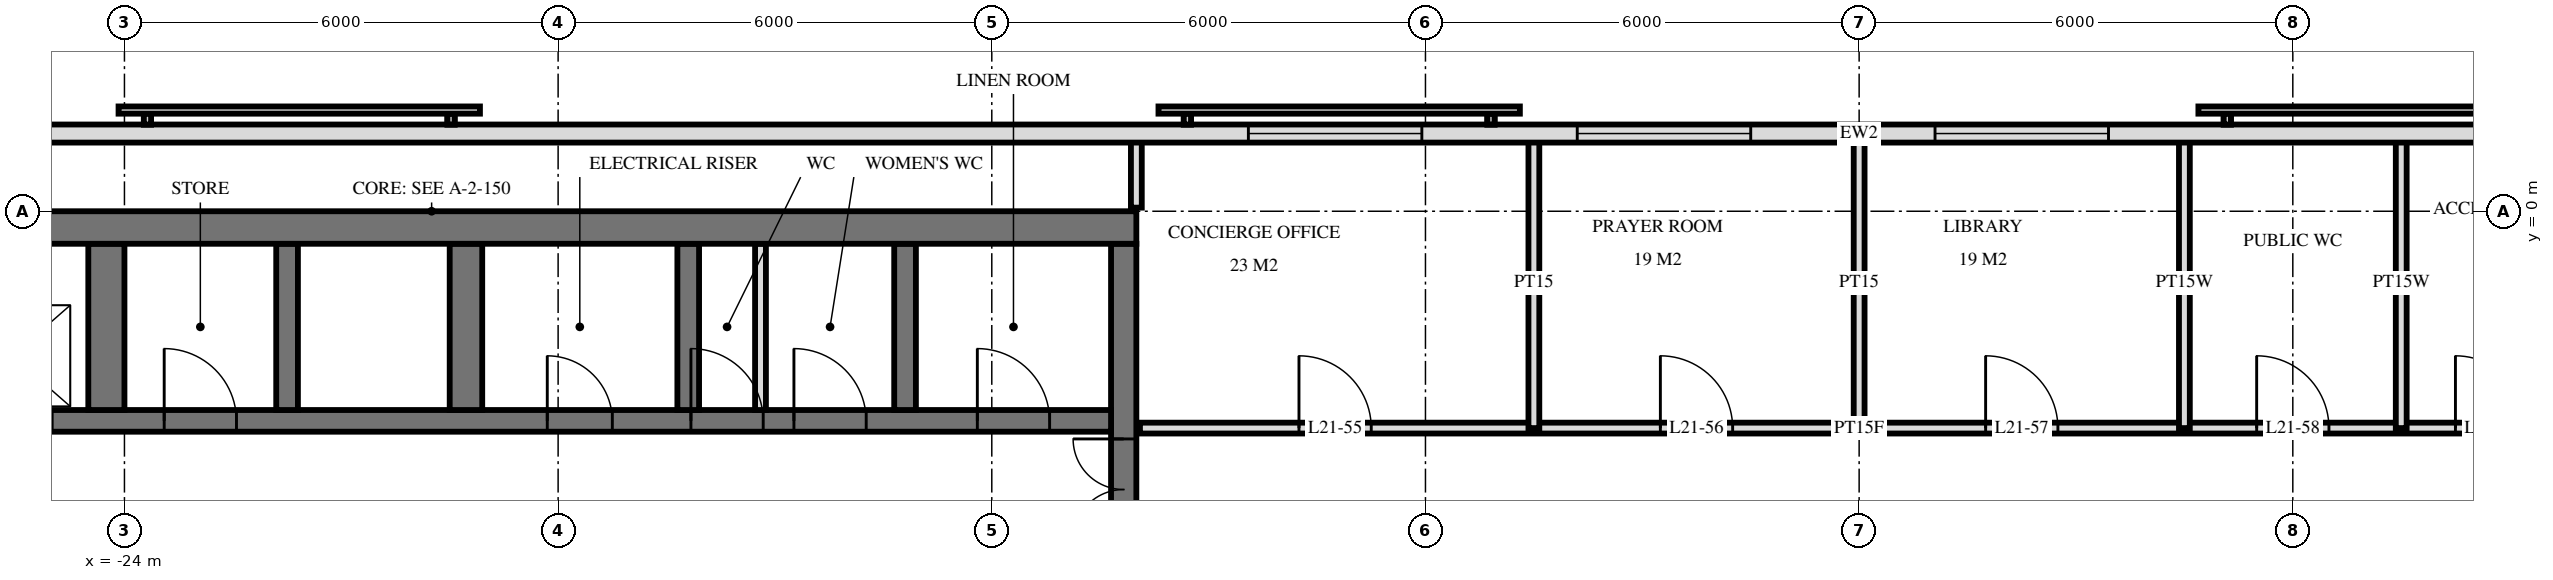
"""IFC4 building model, lengths in metres.
Left out: names, types, materials, properties, quantities, classifications, styles, units other than length and angle.
Written with IfcOpenShell. Run it as: python <this file> out.ifc"""

import sys

from ifc_helpers import new_model, si_unit, direction, frame, frame_2d, origin, place, context, subcontext, project, spatial, rectangle, extrude, element, fill, save


model = new_model("IFC4")
c1 = context("Model", 3, precision=1e-05, world=origin(), true_north=direction((0.0, 1.0)))
c2 = subcontext(c1, "Body", "Model", "MODEL_VIEW")
j1 = project(units=[si_unit("LENGTHUNIT", "METRE"), si_unit("PLANEANGLEUNIT", "RADIAN")], contexts=[c1])
p1 = place(None, origin())
s1 = spatial("IfcSite", under=j1, at=p1, CompositionType="ELEMENT")
p2 = place(p1, origin())
s2 = spatial("IfcBuilding", under=s1, at=p2, CompositionType="ELEMENT")
p3 = place(p2, frame((0.0, 0.0, 85.2)))
s3 = spatial("IfcBuildingStorey", under=s2, at=p3, CompositionType="ELEMENT", Elevation=85.2)
p4 = place(p3, frame((-29.5, -0.225, 0.0), z_axis=(0.0, 0.0, 1.0), x_axis=(1.0, 0.0, 0.0)))
e1 = element("IfcWall", 1, at=p4, inside=s3, PredefinedType="SHEAR", context=c2, shape_type="SweptSolid", body=[
    extrude(rectangle(XDim=19.5, YDim=0.45, at=frame_2d((9.75, 0.0))), origin(), (0.0, 0.0, 1.0), 3.6),
])
p5 = place(p3, frame((-10.175, -14.55, 0.0), z_axis=(0.0, 0.0, 1.0), x_axis=(0.0, 1.0, 0.0)))
e2 = element("IfcWall", 2, at=p5, inside=s3, PredefinedType="SHEAR", context=c2, shape_type="SweptSolid", body=[
    extrude(rectangle(XDim=14.1, YDim=0.35, at=frame_2d((7.05, 0.0))), origin(), (0.0, 0.0, 1.0), 3.6),
])
p6 = place(p5, frame((8.4, 0.0, 0.0)))
e3 = element("IfcOpeningElement", 3, at=p6, cuts=e2, PredefinedType="OPENING", context=c2, shape_type="SweptSolid", body=[
    extrude(rectangle(XDim=1.4, YDim=2.4, at=frame_2d((0.7, 1.2))), frame((0.0, 0.185, 0.0), z_axis=(0.0, -1.0, 0.0), x_axis=(1.0, 0.0, 0.0)), (0.0, 0.0, 1.0), 0.37),
])
p7 = place(p5, frame((10.0, 0.0, 0.0)))
e4 = element("IfcOpeningElement", 4, at=p7, cuts=e2, PredefinedType="OPENING", context=c2, shape_type="SweptSolid", body=[
    extrude(rectangle(XDim=1.4, YDim=2.4, at=frame_2d((0.7, 1.2))), frame((0.0, 0.185, 0.0), z_axis=(0.0, -1.0, 0.0), x_axis=(1.0, 0.0, 0.0)), (0.0, 0.0, 1.0), 0.37),
])
p8 = place(p5, frame((4.0, 0.0, 0.0)))
e5 = element("IfcOpeningElement", 5, at=p8, cuts=e2, PredefinedType="OPENING", context=c2, shape_type="SweptSolid", body=[
    extrude(rectangle(XDim=1.2, YDim=2.1, at=frame_2d((0.6, 1.05))), frame((0.0, 0.185, 0.0), z_axis=(0.0, -1.0, 0.0), x_axis=(1.0, 0.0, 0.0)), (0.0, 0.0, 1.0), 0.37),
])
p9 = place(p3, frame((-29.05, -2.9, 0.0), z_axis=(0.0, 0.0, 1.0), x_axis=(1.0, 0.0, 0.0)))
e6 = element("IfcWall", 6, at=p9, inside=s3, PredefinedType="SHEAR", context=c2, shape_type="SweptSolid", body=[
    extrude(rectangle(XDim=18.7, YDim=0.3, at=frame_2d((9.35, 0.0))), origin(), (0.0, 0.0, 1.0), 3.6),
])
p10 = place(p9, frame((2.95, 0.0, 0.0)))
e7 = element("IfcOpeningElement", 7, at=p10, cuts=e6, PredefinedType="OPENING", context=c2, shape_type="SweptSolid", body=[
    extrude(rectangle(XDim=1.1, YDim=2.1, at=frame_2d((0.55, 1.05))), frame((0.0, 0.16, 0.0), z_axis=(0.0, -1.0, 0.0), x_axis=(1.0, 0.0, 0.0)), (0.0, 0.0, 1.0), 0.32),
])
p11 = place(p9, frame((0.55, 0.0, 0.0)))
e8 = element("IfcOpeningElement", 8, at=p11, cuts=e6, PredefinedType="OPENING", context=c2, shape_type="SweptSolid", body=[
    extrude(rectangle(XDim=1.1, YDim=2.1, at=frame_2d((0.55, 1.05))), frame((0.0, 0.16, 0.0), z_axis=(0.0, -1.0, 0.0), x_axis=(1.0, 0.0, 0.0)), (0.0, 0.0, 1.0), 0.32),
])
p12 = place(p9, frame((10.9, 0.0, 0.0)))
e9 = element("IfcOpeningElement", 9, at=p12, cuts=e6, PredefinedType="OPENING", context=c2, shape_type="SweptSolid", body=[
    extrude(rectangle(XDim=0.9, YDim=2.1, at=frame_2d((0.45, 1.05))), frame((0.0, 0.16, 0.0), z_axis=(0.0, -1.0, 0.0), x_axis=(1.0, 0.0, 0.0)), (0.0, 0.0, 1.0), 0.32),
])
p13 = place(p9, frame((16.85, 0.0, 0.0)))
e10 = element("IfcOpeningElement", 10, at=p13, cuts=e6, PredefinedType="OPENING", context=c2, shape_type="SweptSolid", body=[
    extrude(rectangle(XDim=1.0, YDim=2.1, at=frame_2d((0.5, 1.05))), frame((0.0, 0.16, 0.0), z_axis=(0.0, -1.0, 0.0), x_axis=(1.0, 0.0, 0.0)), (0.0, 0.0, 1.0), 0.32),
])
p14 = place(p9, frame((14.312, 0.0, 0.0)))
e11 = element("IfcOpeningElement", 11, at=p14, cuts=e6, PredefinedType="OPENING", context=c2, shape_type="SweptSolid", body=[
    extrude(rectangle(XDim=1.0, YDim=2.1, at=frame_2d((0.5, 1.05))), frame((0.0, 0.16, 0.0), z_axis=(0.0, -1.0, 0.0), x_axis=(1.0, 0.0, 0.0)), (0.0, 0.0, 1.0), 0.32),
])
p15 = place(p9, frame((12.887, 0.0, 0.0)))
e12 = element("IfcOpeningElement", 12, at=p15, cuts=e6, PredefinedType="OPENING", context=c2, shape_type="SweptSolid", body=[
    extrude(rectangle(XDim=1.0, YDim=2.1, at=frame_2d((0.5, 1.05))), frame((0.0, 0.16, 0.0), z_axis=(0.0, -1.0, 0.0), x_axis=(1.0, 0.0, 0.0)), (0.0, 0.0, 1.0), 0.32),
])
p16 = place(p9, frame((5.6, 0.0, 0.0)))
e13 = element("IfcOpeningElement", 13, at=p16, cuts=e6, PredefinedType="OPENING", context=c2, shape_type="SweptSolid", body=[
    extrude(rectangle(XDim=1.0, YDim=2.1, at=frame_2d((0.5, 1.05))), frame((0.0, 0.16, 0.0), z_axis=(0.0, -1.0, 0.0), x_axis=(1.0, 0.0, 0.0)), (0.0, 0.0, 1.0), 0.32),
])
for number, where, z_axis, x_axis in (
    (14, (-13.2, -2.75, 0.0), (0.0, 0.0, 1.0), (0.0, 1.0, 0.0)),
    (15, (-16.2, -2.75, 0.0), (0.0, 0.0, 1.0), (0.0, 1.0, 0.0)),
):
    element("IfcWall", number, at=place(p3, frame(where, z_axis=z_axis, x_axis=x_axis)), inside=s3, PredefinedType="SHEAR", context=c2, shape_type="SweptSolid", body=[
        extrude(rectangle(XDim=2.3, YDim=0.3, at=frame_2d((1.15, 0.0))), origin(), (0.0, 0.0, 1.0), 3.6),
    ])
p17 = place(p3, frame((-19.275, -2.75, 0.0), z_axis=(0.0, 0.0, 1.0), x_axis=(0.0, 1.0, 0.0)))
e16 = element("IfcWall", 16, at=p17, inside=s3, PredefinedType="SHEAR", context=c2, shape_type="SweptSolid", body=[
    extrude(rectangle(XDim=2.3, YDim=0.45, at=frame_2d((1.15, 0.0))), origin(), (0.0, 0.0, 1.0), 3.6),
])
p18 = place(p3, frame((-21.75, -2.75, 0.0), z_axis=(0.0, 0.0, 1.0), x_axis=(0.0, 1.0, 0.0)))
e17 = element("IfcWall", 17, at=p18, inside=s3, PredefinedType="SHEAR", context=c2, shape_type="SweptSolid", body=[
    extrude(rectangle(XDim=2.3, YDim=0.3, at=frame_2d((1.15, 0.0))), origin(), (0.0, 0.0, 1.0), 3.6),
])
p19 = place(p3, frame((-24.25, -2.75, 0.0), z_axis=(0.0, 0.0, 1.0), x_axis=(0.0, 1.0, 0.0)))
e18 = element("IfcWall", 18, at=p19, inside=s3, PredefinedType="SHEAR", context=c2, shape_type="SweptSolid", body=[
    extrude(rectangle(XDim=2.3, YDim=0.5, at=frame_2d((1.15, 0.0))), origin(), (0.0, 0.0, 1.0), 3.6),
])
p20 = place(p3, frame((28.775, 1.075, 0.0), z_axis=(0.0, 0.0, 1.0), x_axis=(-1.0, 0.0, 0.0)))
e19 = element("IfcWall", 19, at=p20, inside=s3, PredefinedType="SOLIDWALL", context=c2, shape_type="SweptSolid", body=[
    extrude(rectangle(XDim=57.551, YDim=0.25, at=frame_2d((28.775, 0.0))), origin(), (0.0, 0.0, 1.0), 3.32),
])
p21 = place(p20, frame((25.325, 0.0, 0.3)))
e20 = element("IfcOpeningElement", 20, at=p21, cuts=e19, PredefinedType="OPENING", context=c2, shape_type="SweptSolid", body=[
    extrude(rectangle(XDim=2.4, YDim=2.1, at=frame_2d((1.2, 1.05))), frame((0.0, 0.135, 0.0), z_axis=(0.0, -1.0, 0.0), x_axis=(1.0, 0.0, 0.0)), (0.0, 0.0, 1.0), 0.27),
])
p22 = place(p20, frame((30.275, 0.0, 0.3)))
e21 = element("IfcOpeningElement", 21, at=p22, cuts=e19, PredefinedType="OPENING", context=c2, shape_type="SweptSolid", body=[
    extrude(rectangle(XDim=2.4, YDim=2.1, at=frame_2d((1.2, 1.05))), frame((0.0, 0.135, 0.0), z_axis=(0.0, -1.0, 0.0), x_axis=(1.0, 0.0, 0.0)), (0.0, 0.0, 1.0), 0.27),
])
p23 = place(p20, frame((34.825, 0.0, 0.3)))
e22 = element("IfcOpeningElement", 22, at=p23, cuts=e19, PredefinedType="OPENING", context=c2, shape_type="SweptSolid", body=[
    extrude(rectangle(XDim=2.4, YDim=2.1, at=frame_2d((1.2, 1.05))), frame((0.0, 0.135, 0.0), z_axis=(0.0, -1.0, 0.0), x_axis=(1.0, 0.0, 0.0)), (0.0, 0.0, 1.0), 0.27),
])
p24 = place(p3, frame((-15.2, -2.75, 0.0), z_axis=(0.0, 0.0, 1.0), x_axis=(0.0, 1.0, 0.0)))
e23 = element("IfcWall", 23, at=p24, inside=s3, PredefinedType="PARTITIONING", context=c2, shape_type="SweptSolid", body=[
    extrude(rectangle(XDim=2.3, YDim=0.15, at=frame_2d((1.15, 0.0))), origin(), (0.0, 0.0, 1.0), 3.3),
])
for number, where, z_axis, x_axis in (
    (24, (7.5, -3.0, 0.0), (0.0, 0.0, 1.0), (0.0, 1.0, 0.0)),
    (25, (4.5, -3.0, 0.0), (0.0, 0.0, 1.0), (0.0, 1.0, 0.0)),
):
    element("IfcWall", number, at=place(p3, frame(where, z_axis=z_axis, x_axis=x_axis)), inside=s3, PredefinedType="PLUMBINGWALL", context=c2, shape_type="SweptSolid", body=[
        extrude(rectangle(XDim=4.02, YDim=0.15, at=frame_2d((2.01, 0.0))), origin(), (0.0, 0.0, 1.0), 3.32),
    ])
for number, where, z_axis, x_axis in (
    (26, (0.0, -3.0, 0.0), (0.0, 0.0, 1.0), (0.0, 1.0, 0.0)),
    (27, (-4.5, -3.0, 0.0), (0.0, 0.0, 1.0), (0.0, 1.0, 0.0)),
):
    element("IfcWall", number, at=place(p3, frame(where, z_axis=z_axis, x_axis=x_axis)), inside=s3, PredefinedType="PARTITIONING", context=c2, shape_type="SweptSolid", body=[
        extrude(rectangle(XDim=4.02, YDim=0.15, at=frame_2d((2.01, 0.0))), origin(), (0.0, 0.0, 1.0), 3.32),
    ])
p25 = place(p3, frame((-10.0, 0.05, 0.0), z_axis=(0.0, 0.0, 1.0), x_axis=(0.0, 1.0, 0.0)))
e28 = element("IfcWall", 28, at=p25, inside=s3, PredefinedType="PARTITIONING", context=c2, shape_type="SweptSolid", body=[
    extrude(rectangle(XDim=0.97, YDim=0.15, at=frame_2d((0.485, 0.0))), origin(), (0.0, 0.0, 1.0), 3.32),
])
p26 = place(p3, frame((-9.95, -3.0, 0.0), z_axis=(0.0, 0.0, 1.0), x_axis=(1.0, 0.0, 0.0)))
e29 = element("IfcWall", 29, at=p26, inside=s3, PredefinedType="PARTITIONING", context=c2, shape_type="SweptSolid", body=[
    extrude(rectangle(XDim=19.9, YDim=0.15, at=frame_2d((9.95, 0.0))), origin(), (0.0, 0.0, 1.0), 3.32),
])
p27 = place(p26, frame((2.2, 0.0, 0.0)))
e30 = element("IfcOpeningElement", 30, at=p27, cuts=e29, PredefinedType="OPENING", context=c2, shape_type="SweptSolid", body=[
    extrude(rectangle(XDim=1.0, YDim=2.1, at=frame_2d((0.5, 1.05))), frame((0.0, 0.085, 0.0), z_axis=(0.0, -1.0, 0.0), x_axis=(1.0, 0.0, 0.0)), (0.0, 0.0, 1.0), 0.17),
])
p28 = place(p26, frame((7.2, 0.0, 0.0)))
e31 = element("IfcOpeningElement", 31, at=p28, cuts=e29, PredefinedType="OPENING", context=c2, shape_type="SweptSolid", body=[
    extrude(rectangle(XDim=1.0, YDim=2.1, at=frame_2d((0.5, 1.05))), frame((0.0, 0.085, 0.0), z_axis=(0.0, -1.0, 0.0), x_axis=(1.0, 0.0, 0.0)), (0.0, 0.0, 1.0), 0.17),
])
p29 = place(p26, frame((11.7, 0.0, 0.0)))
e32 = element("IfcOpeningElement", 32, at=p29, cuts=e29, PredefinedType="OPENING", context=c2, shape_type="SweptSolid", body=[
    extrude(rectangle(XDim=1.0, YDim=2.1, at=frame_2d((0.5, 1.05))), frame((0.0, 0.085, 0.0), z_axis=(0.0, -1.0, 0.0), x_axis=(1.0, 0.0, 0.0)), (0.0, 0.0, 1.0), 0.17),
])
p30 = place(p26, frame((15.45, 0.0, 0.0)))
e33 = element("IfcOpeningElement", 33, at=p30, cuts=e29, PredefinedType="OPENING", context=c2, shape_type="SweptSolid", body=[
    extrude(rectangle(XDim=1.0, YDim=2.1, at=frame_2d((0.5, 1.05))), frame((0.0, 0.085, 0.0), z_axis=(0.0, -1.0, 0.0), x_axis=(1.0, 0.0, 0.0)), (0.0, 0.0, 1.0), 0.17),
])
p31 = place(p26, frame((18.2, 0.0, 0.0)))
e34 = element("IfcOpeningElement", 34, at=p31, cuts=e29, PredefinedType="OPENING", context=c2, shape_type="SweptSolid", body=[
    extrude(rectangle(XDim=1.0, YDim=2.1, at=frame_2d((0.5, 1.05))), frame((0.0, 0.085, 0.0), z_axis=(0.0, -1.0, 0.0), x_axis=(1.0, 0.0, 0.0)), (0.0, 0.0, 1.0), 0.17),
])
p32 = place(p21, origin())
e35 = element("IfcWindow", 35, at=p32, inside=s3, PartitioningType="SINGLE_PANEL", PredefinedType="WINDOW", context=c2, shape_type="SweptSolid", body=[
    extrude(rectangle(XDim=2.4, YDim=2.1, at=frame_2d((1.2, 1.05))), frame((0.0, 0.03, 0.0), z_axis=(0.0, -1.0, 0.0), x_axis=(1.0, 0.0, 0.0)), (0.0, 0.0, 1.0), 0.06),
])
fill(e20, e35)
p33 = place(p22, origin())
e36 = element("IfcWindow", 36, at=p33, inside=s3, PartitioningType="SINGLE_PANEL", PredefinedType="WINDOW", context=c2, shape_type="SweptSolid", body=[
    extrude(rectangle(XDim=2.4, YDim=2.1, at=frame_2d((1.2, 1.05))), frame((0.0, 0.03, 0.0), z_axis=(0.0, -1.0, 0.0), x_axis=(1.0, 0.0, 0.0)), (0.0, 0.0, 1.0), 0.06),
])
fill(e21, e36)
p34 = place(p23, origin())
e37 = element("IfcWindow", 37, at=p34, inside=s3, PartitioningType="SINGLE_PANEL", PredefinedType="WINDOW", context=c2, shape_type="SweptSolid", body=[
    extrude(rectangle(XDim=2.4, YDim=2.1, at=frame_2d((1.2, 1.05))), frame((0.0, 0.03, 0.0), z_axis=(0.0, -1.0, 0.0), x_axis=(1.0, 0.0, 0.0)), (0.0, 0.0, 1.0), 0.06),
])
fill(e22, e37)
p35 = place(p7, origin())
e38 = element("IfcDoor", 38, at=p35, inside=s3, OperationType="DOUBLE_DOOR_SINGLE_SWING", PredefinedType="DOOR", context=c2, shape_type="SweptSolid", body=[
    extrude(rectangle(XDim=1.4, YDim=2.4, at=frame_2d((0.7, 1.2))), frame((0.0, 0.025, 0.0), z_axis=(0.0, -1.0, 0.0), x_axis=(1.0, 0.0, 0.0)), (0.0, 0.0, 1.0), 0.05),
])
fill(e4, e38)
p36 = place(p12, origin())
e39 = element("IfcDoor", 39, at=p36, inside=s3, OperationType="SINGLE_SWING_RIGHT", PredefinedType="DOOR", context=c2, shape_type="SweptSolid", body=[
    extrude(rectangle(XDim=0.9, YDim=2.1, at=frame_2d((0.45, 1.05))), frame((0.0, 0.025, 0.0), z_axis=(0.0, -1.0, 0.0), x_axis=(1.0, 0.0, 0.0)), (0.0, 0.0, 1.0), 0.05),
])
fill(e9, e39)
p37 = place(p13, origin())
e40 = element("IfcDoor", 40, at=p37, inside=s3, OperationType="SINGLE_SWING_RIGHT", PredefinedType="DOOR", context=c2, shape_type="SweptSolid", body=[
    extrude(rectangle(XDim=1.0, YDim=2.1, at=frame_2d((0.5, 1.05))), frame((0.0, 0.025, 0.0), z_axis=(0.0, -1.0, 0.0), x_axis=(1.0, 0.0, 0.0)), (0.0, 0.0, 1.0), 0.05),
])
fill(e10, e40)
p38 = place(p14, origin())
e41 = element("IfcDoor", 41, at=p38, inside=s3, OperationType="SINGLE_SWING_RIGHT", PredefinedType="DOOR", context=c2, shape_type="SweptSolid", body=[
    extrude(rectangle(XDim=1.0, YDim=2.1, at=frame_2d((0.5, 1.05))), frame((0.0, 0.025, 0.0), z_axis=(0.0, -1.0, 0.0), x_axis=(1.0, 0.0, 0.0)), (0.0, 0.0, 1.0), 0.05),
])
fill(e11, e41)
p39 = place(p15, origin())
e42 = element("IfcDoor", 42, at=p39, inside=s3, OperationType="SINGLE_SWING_RIGHT", PredefinedType="DOOR", context=c2, shape_type="SweptSolid", body=[
    extrude(rectangle(XDim=1.0, YDim=2.1, at=frame_2d((0.5, 1.05))), frame((0.0, 0.025, 0.0), z_axis=(0.0, -1.0, 0.0), x_axis=(1.0, 0.0, 0.0)), (0.0, 0.0, 1.0), 0.05),
])
fill(e12, e42)
p40 = place(p16, origin())
e43 = element("IfcDoor", 43, at=p40, inside=s3, OperationType="SINGLE_SWING_RIGHT", PredefinedType="DOOR", context=c2, shape_type="SweptSolid", body=[
    extrude(rectangle(XDim=1.0, YDim=2.1, at=frame_2d((0.5, 1.05))), frame((0.0, 0.025, 0.0), z_axis=(0.0, -1.0, 0.0), x_axis=(1.0, 0.0, 0.0)), (0.0, 0.0, 1.0), 0.05),
])
fill(e13, e43)
p41 = place(p27, origin())
e44 = element("IfcDoor", 44, at=p41, inside=s3, OperationType="SINGLE_SWING_RIGHT", PredefinedType="DOOR", context=c2, shape_type="SweptSolid", body=[
    extrude(rectangle(XDim=1.0, YDim=2.1, at=frame_2d((0.5, 1.05))), frame((0.0, 0.025, 0.0), z_axis=(0.0, -1.0, 0.0), x_axis=(1.0, 0.0, 0.0)), (0.0, 0.0, 1.0), 0.05),
])
fill(e30, e44)
p42 = place(p28, origin())
e45 = element("IfcDoor", 45, at=p42, inside=s3, OperationType="SINGLE_SWING_RIGHT", PredefinedType="DOOR", context=c2, shape_type="SweptSolid", body=[
    extrude(rectangle(XDim=1.0, YDim=2.1, at=frame_2d((0.5, 1.05))), frame((0.0, 0.025, 0.0), z_axis=(0.0, -1.0, 0.0), x_axis=(1.0, 0.0, 0.0)), (0.0, 0.0, 1.0), 0.05),
])
fill(e31, e45)
p43 = place(p29, origin())
e46 = element("IfcDoor", 46, at=p43, inside=s3, OperationType="SINGLE_SWING_RIGHT", PredefinedType="DOOR", context=c2, shape_type="SweptSolid", body=[
    extrude(rectangle(XDim=1.0, YDim=2.1, at=frame_2d((0.5, 1.05))), frame((0.0, 0.025, 0.0), z_axis=(0.0, -1.0, 0.0), x_axis=(1.0, 0.0, 0.0)), (0.0, 0.0, 1.0), 0.05),
])
fill(e32, e46)
p44 = place(p30, origin())
e47 = element("IfcDoor", 47, at=p44, inside=s3, OperationType="SINGLE_SWING_RIGHT", PredefinedType="DOOR", context=c2, shape_type="SweptSolid", body=[
    extrude(rectangle(XDim=1.0, YDim=2.1, at=frame_2d((0.5, 1.05))), frame((0.0, 0.025, 0.0), z_axis=(0.0, -1.0, 0.0), x_axis=(1.0, 0.0, 0.0)), (0.0, 0.0, 1.0), 0.05),
])
fill(e33, e47)
p45 = place(p31, origin())
e48 = element("IfcDoor", 48, at=p45, inside=s3, OperationType="SINGLE_SWING_RIGHT", PredefinedType="DOOR", context=c2, shape_type="SweptSolid", body=[
    extrude(rectangle(XDim=1.0, YDim=2.1, at=frame_2d((0.5, 1.05))), frame((0.0, 0.025, 0.0), z_axis=(0.0, -1.0, 0.0), x_axis=(1.0, 0.0, 0.0)), (0.0, 0.0, 1.0), 0.05),
])
fill(e34, e48)
save(model, sys.argv[1])
